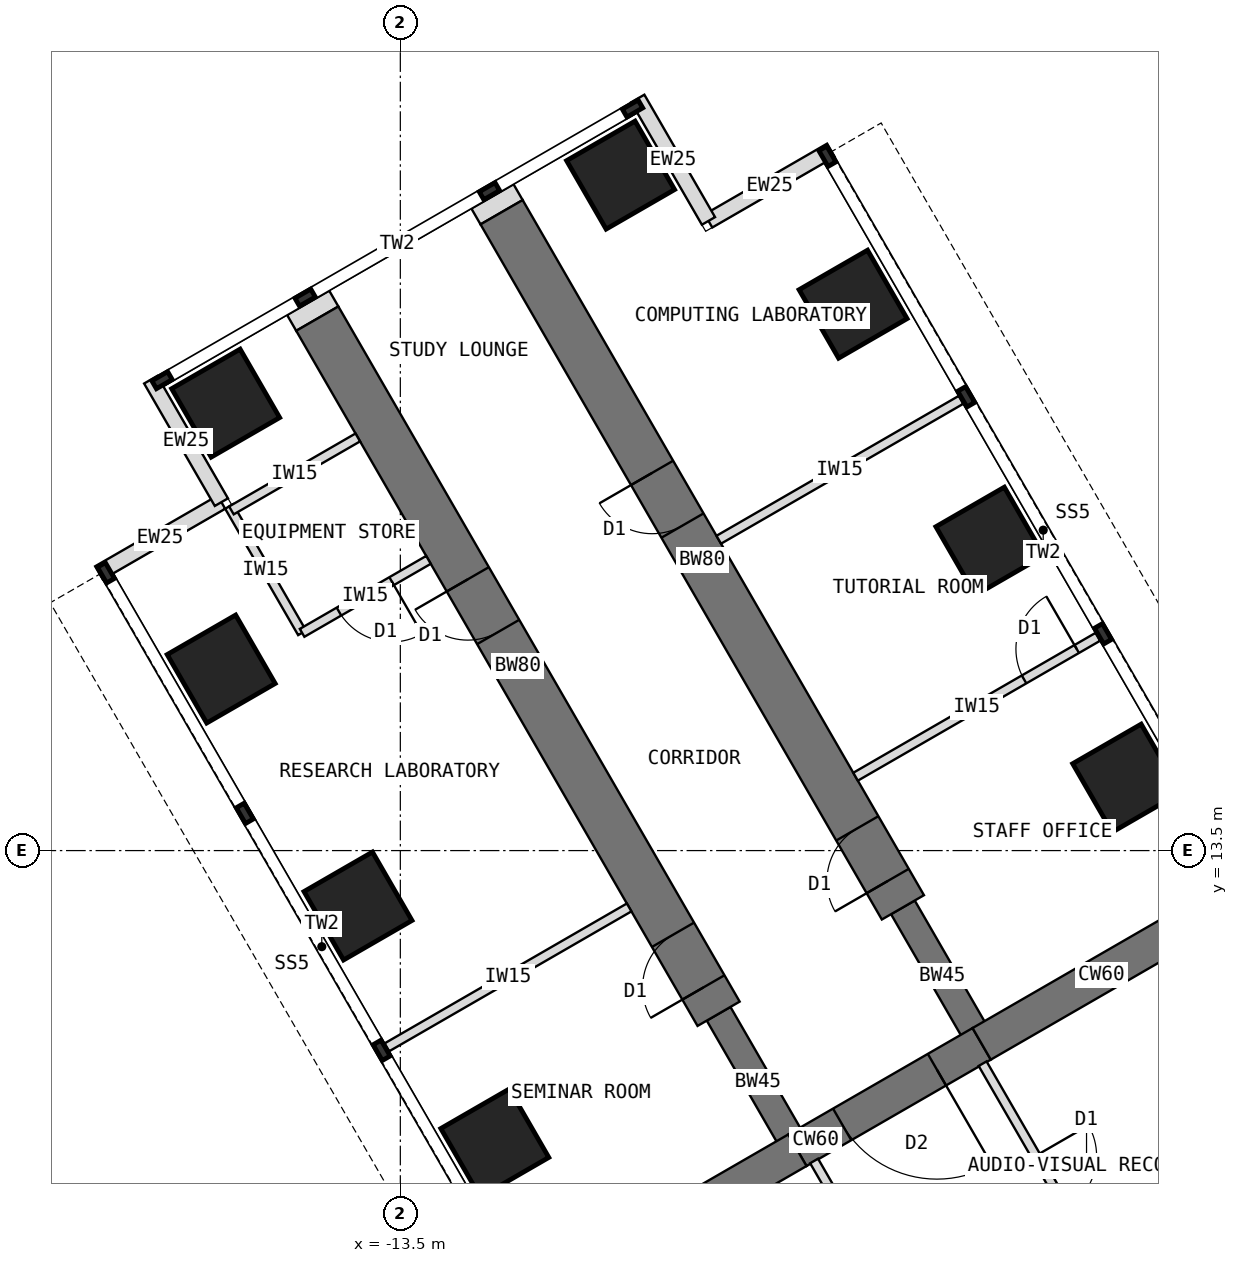
"""IFC4 building model, lengths in metres.
Left out: names, types, materials, properties, quantities, classifications, styles, units other than length and angle.
Written with IfcOpenShell. Run it as: python <this file> out.ifc"""

import sys

from ifc_helpers import new_model, si_unit, direction, frame, frame_2d, origin, origin_2d, place, context, subcontext, project, spatial, rectangle, extrude, element, fill, save


model = new_model("IFC4")
c1 = context("Model", 3, precision=1e-05, world=origin(), true_north=direction((0.0, 1.0)))
c2 = subcontext(c1, "Body", "Model", "MODEL_VIEW")
j1 = project(units=[si_unit("LENGTHUNIT", "METRE"), si_unit("PLANEANGLEUNIT", "RADIAN")], contexts=[c1])
p1 = place(None, origin())
s1 = spatial("IfcSite", under=j1, at=p1, CompositionType="ELEMENT")
p2 = place(p1, origin())
s2 = spatial("IfcBuilding", under=s1, at=p2, CompositionType="ELEMENT")
p3 = place(p2, frame((0.0, 0.0, 125.5)))
s3 = spatial("IfcBuildingStorey", under=s2, at=p3, CompositionType="ELEMENT", Elevation=125.5)
p4 = place(p3, frame((0.0, 12.596, 0.0), z_axis=(0.0, 0.0, 1.0), x_axis=(-0.866011268655, -0.500024481964, 0.0)))
e1 = element("IfcWall", 1, at=p4, inside=s3, PredefinedType="SHEAR", context=c2, shape_type="SweptSolid", body=[
    extrude(rectangle(XDim=4.548, YDim=0.6, at=frame_2d((2.274, 0.0))), origin(), (0.0, 0.0, 1.0), 4.0),
])
p5 = place(p3, frame((-3.939, 10.322, 0.0), z_axis=(0.0, 0.0, 1.0), x_axis=(-0.866019471182, -0.500010275428, 0.0)))
e2 = element("IfcWall", 2, at=p5, inside=s3, PredefinedType="SHEAR", context=c2, shape_type="SweptSolid", body=[
    extrude(rectangle(XDim=3.5, YDim=0.6, at=frame_2d((1.75, 0.0))), origin(), (0.0, 0.0, 1.0), 4.0),
])
p6 = place(p5, frame((0.85, 0.0, 0.0)))
e3 = element("IfcOpeningElement", 3, at=p6, cuts=e2, PredefinedType="OPENING", context=c2, shape_type="SweptSolid", body=[
    extrude(rectangle(XDim=1.8, YDim=2.1, at=frame_2d((0.9, 1.05))), frame((0.0, 0.31, 0.0), z_axis=(0.0, -1.0, 0.0), x_axis=(1.0, 0.0, 0.0)), (0.0, 0.0, 1.0), 0.62),
])
p7 = place(p3, frame((-6.97, 8.572, 0.0), z_axis=(0.0, 0.0, 1.0), x_axis=(-0.866034513004, -0.499984222037, 0.0)))
e4 = element("IfcWall", 4, at=p7, inside=s3, PredefinedType="SHEAR", context=c2, shape_type="SweptSolid", body=[
    extrude(rectangle(XDim=4.548, YDim=0.6, at=frame_2d((2.274, 0.0))), origin(), (0.0, 0.0, 1.0), 4.0),
])
p8 = place(p3, frame((-6.97, 8.572, 0.0), z_axis=(0.0, 0.0, 1.0), x_axis=(-0.499988811324, 0.866031863473, 0.0)))
e5 = element("IfcWall", 5, at=p8, inside=s3, PredefinedType="SHEAR", context=c2, shape_type="SweptSolid", body=[
    extrude(rectangle(XDim=2.592, YDim=0.45, at=frame_2d((1.296, 0.0))), origin(), (0.0, 0.0, 1.0), 4.0),
])
p9 = place(p3, frame((-8.266, 10.816, 0.0), z_axis=(0.0, 0.0, 1.0), x_axis=(-0.499996231654, 0.866027579429, 0.0)))
e6 = element("IfcWall", 6, at=p9, inside=s3, PredefinedType="SHEAR", context=c2, shape_type="SweptSolid", body=[
    extrude(rectangle(XDim=13.2, YDim=0.8, at=frame_2d((6.6, 0.0))), origin(), (0.0, 0.0, 1.0), 4.0),
])
p10 = place(p9, frame((0.5, 0.0, 0.0)))
e7 = element("IfcOpeningElement", 7, at=p10, cuts=e6, PredefinedType="OPENING", context=c2, shape_type="SweptSolid", body=[
    extrude(rectangle(XDim=1.0, YDim=2.1, at=frame_2d((0.5, 1.05))), frame((0.0, 0.41, 0.0), z_axis=(0.0, -1.0, 0.0), x_axis=(1.0, 0.0, 0.0)), (0.0, 0.0, 1.0), 0.82),
])
p11 = place(p9, frame((7.25, 0.0, 0.0)))
e8 = element("IfcOpeningElement", 8, at=p11, cuts=e6, PredefinedType="OPENING", context=c2, shape_type="SweptSolid", body=[
    extrude(rectangle(XDim=1.0, YDim=2.1, at=frame_2d((0.5, 1.05))), frame((0.0, 0.41, 0.0), z_axis=(0.0, -1.0, 0.0), x_axis=(1.0, 0.0, 0.0)), (0.0, 0.0, 1.0), 0.82),
])
p12 = place(p3, frame((-3.939, 10.322, 0.0), z_axis=(0.0, 0.0, 1.0), x_axis=(-0.499918158782, 0.866072649678, 0.0)))
e9 = element("IfcWall", 9, at=p12, inside=s3, PredefinedType="SHEAR", context=c2, shape_type="SweptSolid", body=[
    extrude(rectangle(XDim=2.592, YDim=0.45, at=frame_2d((1.296, 0.0))), origin(), (0.0, 0.0, 1.0), 4.0),
])
p13 = place(p3, frame((-5.234, 12.566, 0.0), z_axis=(0.0, 0.0, 1.0), x_axis=(-0.500010103361, 0.866019570528, 0.0)))
e10 = element("IfcWall", 10, at=p13, inside=s3, PredefinedType="SHEAR", context=c2, shape_type="SweptSolid", body=[
    extrude(rectangle(XDim=13.2, YDim=0.8, at=frame_2d((6.6, 0.0))), origin(), (0.0, 0.0, 1.0), 4.0),
])
p14 = place(p13, frame((0.5, 0.0, 0.0)))
e11 = element("IfcOpeningElement", 11, at=p14, cuts=e10, PredefinedType="OPENING", context=c2, shape_type="SweptSolid", body=[
    extrude(rectangle(XDim=1.0, YDim=2.1, at=frame_2d((0.5, 1.05))), frame((0.0, 0.41, 0.0), z_axis=(0.0, -1.0, 0.0), x_axis=(1.0, 0.0, 0.0)), (0.0, 0.0, 1.0), 0.82),
])
p15 = place(p13, frame((7.25, 0.0, 0.0)))
e12 = element("IfcOpeningElement", 12, at=p15, cuts=e10, PredefinedType="OPENING", context=c2, shape_type="SweptSolid", body=[
    extrude(rectangle(XDim=1.0, YDim=2.1, at=frame_2d((0.5, 1.05))), frame((0.0, 0.41, 0.0), z_axis=(0.0, -1.0, 0.0), x_axis=(1.0, 0.0, 0.0)), (0.0, 0.0, 1.0), 0.82),
])
for number, where, z_axis, x_axis in (
    (13, (-11.946, 8.691, 0.0), (0.0, 0.0, 1.0), (0.866, 0.5, 0.0)),
    (14, (-1.554, 14.691, 0.0), (0.0, 0.0, 1.0), (0.866, 0.5, 0.0)),
    (15, (-14.196, 12.588, 0.0), (0.0, 0.0, 1.0), (0.866, 0.5, 0.0)),
    (16, (-3.804, 18.588, 0.0), (0.0, 0.0, 1.0), (0.866, 0.5, 0.0)),
    (17, (-16.446, 16.486, 0.0), (0.0, 0.0, 1.0), (0.866, 0.5, 0.0)),
    (18, (-6.054, 22.486, 0.0), (0.0, 0.0, 1.0), (0.866, 0.5, 0.0)),
    (19, (-16.373, 20.858, 0.0), (0.0, 0.0, 1.0), (0.866, 0.5, 0.0)),
    (20, (-9.877, 24.608, 0.0), (0.0, 0.0, 1.0), (0.866, 0.5, 0.0)),
):
    element("IfcColumn", number, at=place(p3, frame(where, z_axis=z_axis, x_axis=x_axis)), inside=s3, PredefinedType="COLUMN", context=c2, shape_type="SweptSolid", body=[
        extrude(rectangle(XDim=1.3, YDim=1.3, at=origin_2d()), origin(), (0.0, 0.0, 1.0), 4.0),
    ])
for number, where, z_axis, x_axis in (
    (21, (-18.456, 18.067, 0.0), (0.0, 0.0, 1.0), (0.866, 0.5, 0.0)),
    (22, (-16.443, 19.23, 0.0), (0.0, 0.0, 1.0), (-0.5, 0.866, 0.0)),
    (23, (-6.419, 25.017, 0.0), (0.0, 0.0, 1.0), (-0.866, -0.5, 0.0)),
    (24, (-8.432, 23.855, 0.0), (0.0, 0.0, 1.0), (-0.5, 0.866, 0.0)),
):
    element("IfcWall", number, at=place(p3, frame(where, z_axis=z_axis, x_axis=x_axis)), inside=s3, PredefinedType="STANDARD", context=c2, shape_type="SweptSolid", body=[
        extrude(rectangle(XDim=2.325, YDim=0.25, at=frame_2d((1.163, 0.0))), origin(), (0.0, 0.0, 1.0), 3.8),
    ])
p16 = place(p3, frame((-14.865, 22.248, 0.0), z_axis=(0.0, 0.0, 1.0), x_axis=(-0.500426713919, 0.865778900179, 0.0)))
e25 = element("IfcWall", 25, at=p16, inside=s3, PredefinedType="PARTITIONING", context=c2, shape_type="SweptSolid", body=[
    extrude(rectangle(XDim=0.3, YDim=0.8, at=frame_2d((0.15, 0.0))), origin(), (0.0, 0.0, 1.0), 3.8),
])
p17 = place(p3, frame((-11.834, 23.998, 0.0), z_axis=(0.0, 0.0, 1.0), x_axis=(-0.499816412211, 0.866131372301, 0.0)))
e26 = element("IfcWall", 26, at=p17, inside=s3, PredefinedType="PARTITIONING", context=c2, shape_type="SweptSolid", body=[
    extrude(rectangle(XDim=0.3, YDim=0.8, at=frame_2d((0.15, 0.0))), origin(), (0.0, 0.0, 1.0), 3.8),
])
p18 = place(p3, frame((-1.201, 6.12, 0.0), z_axis=(0.0, 0.0, 1.0), x_axis=(0.49999668571, 0.866027317282, 0.0)))
e27 = element("IfcWall", 27, at=p18, inside=s3, PredefinedType="SHEAR", context=c2, shape_type="SweptSolid", body=[
    extrude(rectangle(XDim=5.908, YDim=0.4, at=frame_2d((2.954, 0.0))), origin(), (0.0, 0.0, 1.0), 4.0),
])
p19 = place(p3, frame((-9.737, 12.565, 0.0), z_axis=(0.0, 0.0, 1.0), x_axis=(-0.866016770315, -0.500014953309, 0.0)))
e28 = element("IfcWall", 28, at=p19, inside=s3, PredefinedType="PARTITIONING", context=c2, shape_type="SweptSolid", body=[
    extrude(rectangle(XDim=4.6, YDim=0.15, at=frame_2d((2.3, 0.0))), origin(), (0.0, 0.0, 1.0), 3.8),
])
p20 = place(p3, frame((-15.115, 17.081, 0.0), z_axis=(0.0, 0.0, 1.0), x_axis=(-0.499957262057, 0.866050077142, 0.0)))
e29 = element("IfcWall", 29, at=p20, inside=s3, PredefinedType="PARTITIONING", context=c2, shape_type="SweptSolid", body=[
    extrude(rectangle(XDim=2.4, YDim=0.15, at=frame_2d((1.2, 0.0))), origin(), (0.0, 0.0, 1.0), 3.8),
])
p21 = place(p3, frame((-13.037, 18.281, 0.0), z_axis=(0.0, 0.0, 1.0), x_axis=(-0.866006032174, -0.500033551112, 0.0)))
e30 = element("IfcWall", 30, at=p21, inside=s3, PredefinedType="PARTITIONING", context=c2, shape_type="SweptSolid", body=[
    extrude(rectangle(XDim=2.4, YDim=0.15, at=frame_2d((1.2, 0.0))), origin(), (0.0, 0.0, 1.0), 3.8),
])
p22 = place(p21, frame((0.7, 0.0, 0.0)))
e31 = element("IfcOpeningElement", 31, at=p22, cuts=e30, PredefinedType="OPENING", context=c2, shape_type="SweptSolid", body=[
    extrude(rectangle(XDim=1.0, YDim=2.1, at=frame_2d((0.5, 1.05))), frame((0.0, 0.085, 0.0), z_axis=(0.0, -1.0, 0.0), x_axis=(1.0, 0.0, 0.0)), (0.0, 0.0, 1.0), 0.17),
])
p23 = place(p3, frame((-14.199, 20.294, 0.0), z_axis=(0.0, 0.0, 1.0), x_axis=(-0.866024647952, -0.500001309137, 0.0)))
e32 = element("IfcWall", 32, at=p23, inside=s3, PredefinedType="PARTITIONING", context=c2, shape_type="SweptSolid", body=[
    extrude(rectangle(XDim=2.4, YDim=0.15, at=frame_2d((1.2, 0.0))), origin(), (0.0, 0.0, 1.0), 3.8),
])
p24 = place(p3, frame((-6.013, 14.715, 0.0), z_axis=(0.0, 0.0, 1.0), x_axis=(0.866016770315, 0.500014953309, 0.0)))
e33 = element("IfcWall", 33, at=p24, inside=s3, PredefinedType="PARTITIONING", context=c2, shape_type="SweptSolid", body=[
    extrude(rectangle(XDim=4.6, YDim=0.15, at=frame_2d((2.3, 0.0))), origin(), (0.0, 0.0, 1.0), 3.8),
])
p25 = place(p24, frame((3.2, 0.0, 0.0)))
e34 = element("IfcOpeningElement", 34, at=p25, cuts=e33, PredefinedType="OPENING", context=c2, shape_type="SweptSolid", body=[
    extrude(rectangle(XDim=1.0, YDim=2.1, at=frame_2d((0.5, 1.05))), frame((0.0, 0.085, 0.0), z_axis=(0.0, -1.0, 0.0), x_axis=(1.0, 0.0, 0.0)), (0.0, 0.0, 1.0), 0.17),
])
p26 = place(p3, frame((-8.263, 18.612, 0.0), z_axis=(0.0, 0.0, 1.0), x_axis=(0.866016770315, 0.500014953309, 0.0)))
e35 = element("IfcWall", 35, at=p26, inside=s3, PredefinedType="PARTITIONING", context=c2, shape_type="SweptSolid", body=[
    extrude(rectangle(XDim=4.6, YDim=0.15, at=frame_2d((2.3, 0.0))), origin(), (0.0, 0.0, 1.0), 3.8),
])
p27 = place(p3, frame((-4.436, 4.483, 0.0), z_axis=(0.0, 0.0, 1.0), x_axis=(-0.500009315796, 0.86602002524, 0.0)))
e36 = element("IfcWall", 36, at=p27, inside=s3, PredefinedType="PARTITIONING", context=c2, shape_type="SweptSolid", body=[
    extrude(rectangle(XDim=4.519, YDim=0.15, at=frame_2d((2.259, 0.0))), origin(), (0.0, 0.0, 1.0), 3.8),
])
p28 = place(p27, frame((1.769, 0.0, 0.0)))
e37 = element("IfcOpeningElement", 37, at=p28, cuts=e36, PredefinedType="OPENING", context=c2, shape_type="SweptSolid", body=[
    extrude(rectangle(XDim=1.0, YDim=2.1, at=frame_2d((0.5, 1.05))), frame((0.0, 0.085, 0.0), z_axis=(0.0, -1.0, 0.0), x_axis=(1.0, 0.0, 0.0)), (0.0, 0.0, 1.0), 0.17),
])
p29 = place(p3, frame((-3.924, 9.996, 0.0), z_axis=(0.0, 0.0, 1.0), x_axis=(0.500032713409, -0.866006515865, 0.0)))
e38 = element("IfcWall", 38, at=p29, inside=s3, PredefinedType="PARTITIONING", context=c2, shape_type="SweptSolid", body=[
    extrude(rectangle(XDim=4.518, YDim=0.15, at=frame_2d((2.259, 0.0))), origin(), (0.0, 0.0, 1.0), 3.8),
])
p30 = place(p29, frame((1.749, 0.0, 0.0)))
e39 = element("IfcOpeningElement", 39, at=p30, cuts=e38, PredefinedType="OPENING", context=c2, shape_type="SweptSolid", body=[
    extrude(rectangle(XDim=1.0, YDim=2.1, at=frame_2d((0.5, 1.05))), frame((0.0, 0.085, 0.0), z_axis=(0.0, -1.0, 0.0), x_axis=(1.0, 0.0, 0.0)), (0.0, 0.0, 1.0), 0.17),
])
p31 = place(p6, origin())
e40 = element("IfcDoor", 40, at=p31, inside=s3, OperationType="DOUBLE_DOOR_DOUBLE_SWING", PredefinedType="DOOR", context=c2, shape_type="SweptSolid", body=[
    extrude(rectangle(XDim=1.72, YDim=2.06, at=frame_2d((0.9, 1.03))), frame((0.0, 0.025, 0.0), z_axis=(0.0, -1.0, 0.0), x_axis=(1.0, 0.0, 0.0)), (0.0, 0.0, 1.0), 0.05),
    extrude(rectangle(XDim=0.04, YDim=2.1, at=frame_2d((0.02, 1.05))), frame((0.0, 0.3, 0.0), z_axis=(0.0, -1.0, 0.0), x_axis=(1.0, 0.0, 0.0)), (0.0, 0.0, 1.0), 0.6),
    extrude(rectangle(XDim=0.04, YDim=2.1, at=frame_2d((1.78, 1.05))), frame((0.0, 0.3, 0.0), z_axis=(0.0, -1.0, 0.0), x_axis=(1.0, 0.0, 0.0)), (0.0, 0.0, 1.0), 0.6),
    extrude(rectangle(XDim=1.72, YDim=0.04, at=frame_2d((0.9, 2.08))), frame((0.0, 0.3, 0.0), z_axis=(0.0, -1.0, 0.0), x_axis=(1.0, 0.0, 0.0)), (0.0, 0.0, 1.0), 0.6),
])
fill(e3, e40)
p32 = place(p22, origin())
e41 = element("IfcDoor", 41, at=p32, inside=s3, OperationType="SINGLE_SWING_LEFT", PredefinedType="DOOR", context=c2, shape_type="SweptSolid", body=[
    extrude(rectangle(XDim=1.0, YDim=2.1, at=frame_2d((0.5, 1.05))), frame((0.0, 0.025, 0.0), z_axis=(0.0, -1.0, 0.0), x_axis=(1.0, 0.0, 0.0)), (0.0, 0.0, 1.0), 0.05),
])
fill(e31, e41)
p33 = place(p25, origin())
e42 = element("IfcDoor", 42, at=p33, inside=s3, OperationType="SINGLE_SWING_RIGHT", PredefinedType="DOOR", context=c2, shape_type="SweptSolid", body=[
    extrude(rectangle(XDim=1.0, YDim=2.1, at=frame_2d((0.5, 1.05))), frame((0.0, 0.025, 0.0), z_axis=(0.0, -1.0, 0.0), x_axis=(1.0, 0.0, 0.0)), (0.0, 0.0, 1.0), 0.05),
])
fill(e34, e42)
p34 = place(p30, origin())
e43 = element("IfcDoor", 43, at=p34, inside=s3, OperationType="SINGLE_SWING_LEFT", PredefinedType="DOOR", context=c2, shape_type="SweptSolid", body=[
    extrude(rectangle(XDim=1.0, YDim=2.1, at=frame_2d((0.5, 1.05))), frame((0.0, 0.025, 0.0), z_axis=(0.0, -1.0, 0.0), x_axis=(1.0, 0.0, 0.0)), (0.0, 0.0, 1.0), 0.05),
])
fill(e39, e43)
p35 = place(p10, origin())
e44 = element("IfcDoor", 44, at=p35, inside=s3, OperationType="SINGLE_SWING_LEFT", PredefinedType="DOOR", context=c2, shape_type="SweptSolid", body=[
    extrude(rectangle(XDim=0.92, YDim=2.06, at=frame_2d((0.5, 1.03))), frame((0.0, 0.025, 0.0), z_axis=(0.0, -1.0, 0.0), x_axis=(1.0, 0.0, 0.0)), (0.0, 0.0, 1.0), 0.05),
    extrude(rectangle(XDim=0.04, YDim=2.1, at=frame_2d((0.02, 1.05))), frame((0.0, 0.4, 0.0), z_axis=(0.0, -1.0, 0.0), x_axis=(1.0, 0.0, 0.0)), (0.0, 0.0, 1.0), 0.8),
    extrude(rectangle(XDim=0.04, YDim=2.1, at=frame_2d((0.98, 1.05))), frame((0.0, 0.4, 0.0), z_axis=(0.0, -1.0, 0.0), x_axis=(1.0, 0.0, 0.0)), (0.0, 0.0, 1.0), 0.8),
    extrude(rectangle(XDim=0.92, YDim=0.04, at=frame_2d((0.5, 2.08))), frame((0.0, 0.4, 0.0), z_axis=(0.0, -1.0, 0.0), x_axis=(1.0, 0.0, 0.0)), (0.0, 0.0, 1.0), 0.8),
])
fill(e7, e44)
p36 = place(p11, origin())
e45 = element("IfcDoor", 45, at=p36, inside=s3, OperationType="SINGLE_SWING_RIGHT", PredefinedType="DOOR", context=c2, shape_type="SweptSolid", body=[
    extrude(rectangle(XDim=0.92, YDim=2.06, at=frame_2d((0.5, 1.03))), frame((0.0, 0.025, 0.0), z_axis=(0.0, -1.0, 0.0), x_axis=(1.0, 0.0, 0.0)), (0.0, 0.0, 1.0), 0.05),
    extrude(rectangle(XDim=0.04, YDim=2.1, at=frame_2d((0.02, 1.05))), frame((0.0, 0.4, 0.0), z_axis=(0.0, -1.0, 0.0), x_axis=(1.0, 0.0, 0.0)), (0.0, 0.0, 1.0), 0.8),
    extrude(rectangle(XDim=0.04, YDim=2.1, at=frame_2d((0.98, 1.05))), frame((0.0, 0.4, 0.0), z_axis=(0.0, -1.0, 0.0), x_axis=(1.0, 0.0, 0.0)), (0.0, 0.0, 1.0), 0.8),
    extrude(rectangle(XDim=0.92, YDim=0.04, at=frame_2d((0.5, 2.08))), frame((0.0, 0.4, 0.0), z_axis=(0.0, -1.0, 0.0), x_axis=(1.0, 0.0, 0.0)), (0.0, 0.0, 1.0), 0.8),
])
fill(e8, e45)
p37 = place(p14, origin())
e46 = element("IfcDoor", 46, at=p37, inside=s3, OperationType="SINGLE_SWING_LEFT", PredefinedType="DOOR", context=c2, shape_type="SweptSolid", body=[
    extrude(rectangle(XDim=0.92, YDim=2.06, at=frame_2d((0.5, 1.03))), frame((0.0, 0.025, 0.0), z_axis=(0.0, -1.0, 0.0), x_axis=(1.0, 0.0, 0.0)), (0.0, 0.0, 1.0), 0.05),
    extrude(rectangle(XDim=0.04, YDim=2.1, at=frame_2d((0.02, 1.05))), frame((0.0, 0.4, 0.0), z_axis=(0.0, -1.0, 0.0), x_axis=(1.0, 0.0, 0.0)), (0.0, 0.0, 1.0), 0.8),
    extrude(rectangle(XDim=0.04, YDim=2.1, at=frame_2d((0.98, 1.05))), frame((0.0, 0.4, 0.0), z_axis=(0.0, -1.0, 0.0), x_axis=(1.0, 0.0, 0.0)), (0.0, 0.0, 1.0), 0.8),
    extrude(rectangle(XDim=0.92, YDim=0.04, at=frame_2d((0.5, 2.08))), frame((0.0, 0.4, 0.0), z_axis=(0.0, -1.0, 0.0), x_axis=(1.0, 0.0, 0.0)), (0.0, 0.0, 1.0), 0.8),
])
fill(e11, e46)
p38 = place(p15, origin())
e47 = element("IfcDoor", 47, at=p38, inside=s3, OperationType="SINGLE_SWING_RIGHT", PredefinedType="DOOR", context=c2, shape_type="SweptSolid", body=[
    extrude(rectangle(XDim=0.92, YDim=2.06, at=frame_2d((0.5, 1.03))), frame((0.0, 0.025, 0.0), z_axis=(0.0, -1.0, 0.0), x_axis=(1.0, 0.0, 0.0)), (0.0, 0.0, 1.0), 0.05),
    extrude(rectangle(XDim=0.04, YDim=2.1, at=frame_2d((0.02, 1.05))), frame((0.0, 0.4, 0.0), z_axis=(0.0, -1.0, 0.0), x_axis=(1.0, 0.0, 0.0)), (0.0, 0.0, 1.0), 0.8),
    extrude(rectangle(XDim=0.04, YDim=2.1, at=frame_2d((0.98, 1.05))), frame((0.0, 0.4, 0.0), z_axis=(0.0, -1.0, 0.0), x_axis=(1.0, 0.0, 0.0)), (0.0, 0.0, 1.0), 0.8),
    extrude(rectangle(XDim=0.92, YDim=0.04, at=frame_2d((0.5, 2.08))), frame((0.0, 0.4, 0.0), z_axis=(0.0, -1.0, 0.0), x_axis=(1.0, 0.0, 0.0)), (0.0, 0.0, 1.0), 0.8),
])
fill(e12, e47)
save(model, sys.argv[1])
